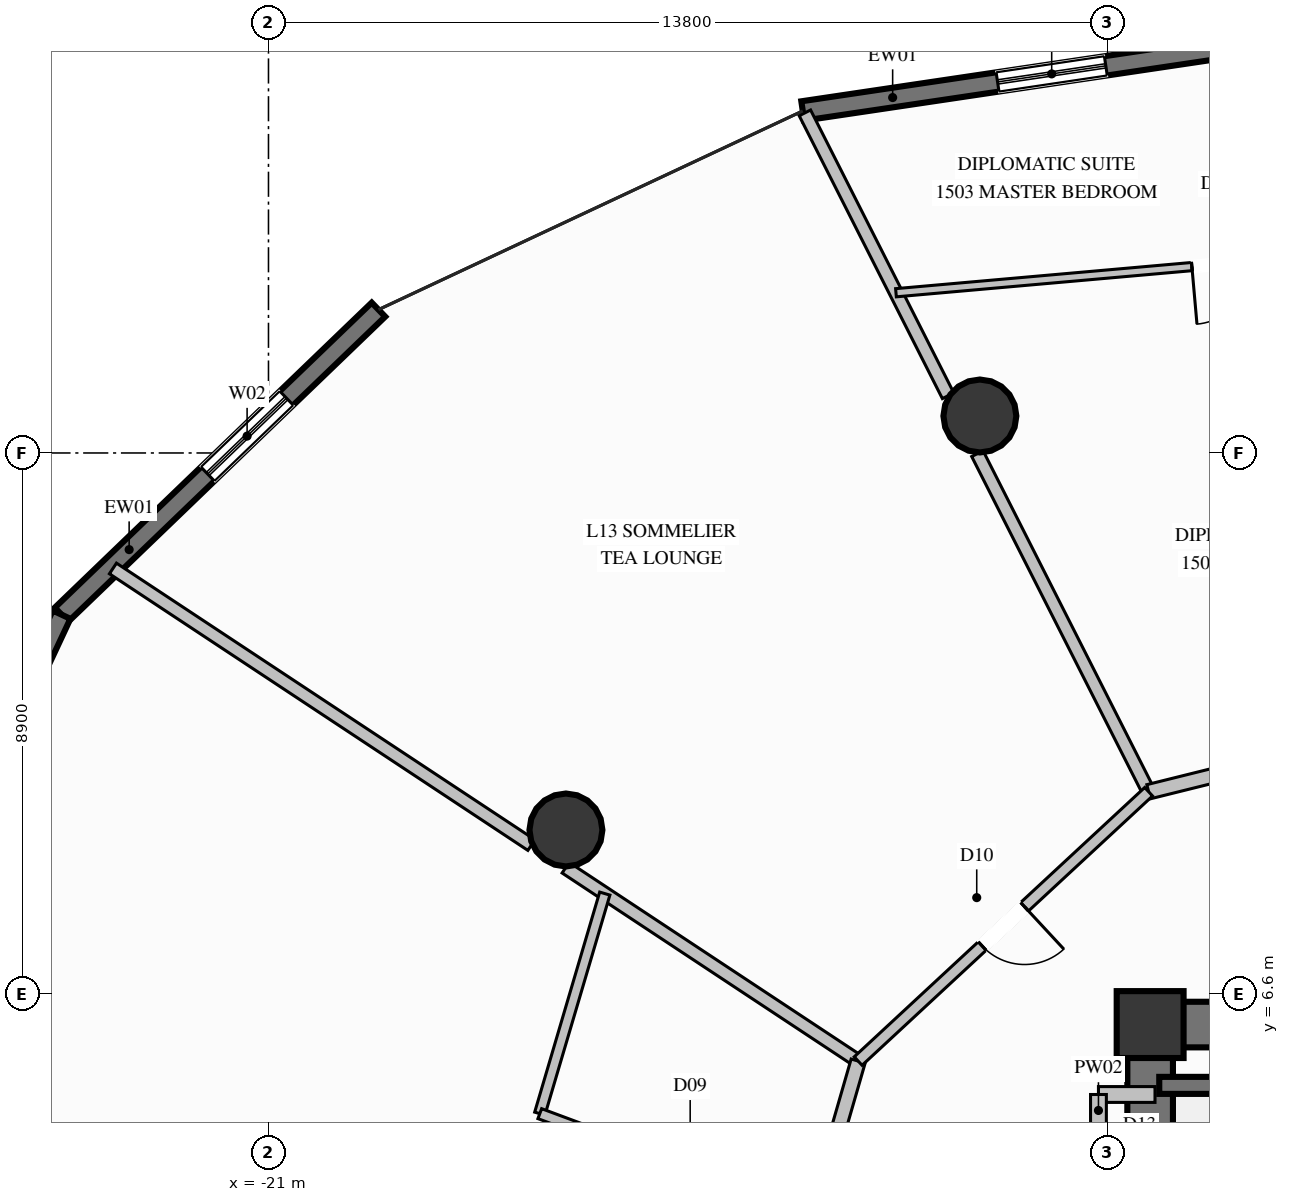
"""IFC4 building model, lengths in metres.
Left out: names, types, materials, properties, quantities, classifications, styles, units other than length and angle.
Written with IfcOpenShell. Run it as: python <this file> out.ifc"""

import sys

from ifc_helpers import new_model, si_unit, direction, frame, frame_2d, origin, origin_2d, place, context, subcontext, project, spatial, rectangle, circle, extrude, element, fill, save


model = new_model("IFC4")
c1 = context("Model", 3, precision=1e-05, world=origin(), true_north=direction((0.0, 1.0)))
c2 = subcontext(c1, "Body", "Model", "MODEL_VIEW")
j1 = project(units=[si_unit("LENGTHUNIT", "METRE"), si_unit("PLANEANGLEUNIT", "RADIAN")], contexts=[c1])
p1 = place(None, origin())
s1 = spatial("IfcSite", under=j1, at=p1, CompositionType="ELEMENT")
p2 = place(p1, origin())
s2 = spatial("IfcBuilding", under=s1, at=p2, CompositionType="ELEMENT")
p3 = place(p2, frame((0.0, 0.0, 57.2)))
s3 = spatial("IfcBuildingStorey", under=s2, at=p3, CompositionType="ELEMENT", Elevation=57.2)
p4 = place(p3, frame((-6.5, 6.1, 0.0), z_axis=(0.0, 0.0, 1.0), x_axis=(1.0, 0.0, 0.0)))
e1 = element("IfcColumn", 1, at=p4, inside=s3, PredefinedType="COLUMN", context=c2, shape_type="SweptSolid", body=[
    extrude(rectangle(XDim=1.1, YDim=1.1, at=origin_2d()), origin(), (0.0, 0.0, 1.0), 3.6),
])
p5 = place(p3, frame((-6.125, 6.1, 0.0), z_axis=(0.0, 0.0, 1.0), x_axis=(1.0, 0.0, 0.0)))
e2 = element("IfcWall", 2, at=p5, inside=s3, PredefinedType="SHEAR", context=c2, shape_type="SweptSolid", body=[
    extrude(rectangle(XDim=2.525, YDim=0.75, at=frame_2d((1.262, 0.0))), origin(), (0.0, 0.0, 1.0), 3.6),
])
p6 = place(p3, frame((-6.5, 2.35, 0.0), z_axis=(0.0, 0.0, 1.0), x_axis=(0.0, 1.0, 0.0)))
e3 = element("IfcWall", 3, at=p6, inside=s3, PredefinedType="SHEAR", context=c2, shape_type="SweptSolid", body=[
    extrude(rectangle(XDim=4.125, YDim=0.75, at=frame_2d((2.062, 0.0))), origin(), (0.0, 0.0, 1.0), 3.6),
])
for number, where, z_axis, x_axis in (
    (4, (-9.3, 16.108, 0.0), (0.0, 0.0, 1.0), (1.0, 0.0, 0.0)),
    (5, (-16.108, 9.3, 0.0), (0.0, 0.0, 1.0), (1.0, 0.0, 0.0)),
):
    element("IfcColumn", number, at=place(p3, frame(where, z_axis=z_axis, x_axis=x_axis)), inside=s3, PredefinedType="COLUMN", context=c2, shape_type="SweptSolid", body=[
        extrude(circle(Radius=0.6, at=origin_2d()), origin(), (0.0, 0.0, 1.0), 3.6),
    ])
p7 = place(p3, frame((-12.213, 21.125, 0.0), z_axis=(0.0, 0.0, 1.0), x_axis=(0.989115613059, 0.147140422734, 0.0)))
e6 = element("IfcWall", 6, at=p7, inside=s3, PredefinedType="SOLIDWALL", context=c2, shape_type="SweptSolid", body=[
    extrude(rectangle(XDim=8.148, YDim=0.32, at=frame_2d((4.074, 0.0))), origin(), (0.0, 0.0, 1.0), 3.34),
])
p8 = place(p7, frame((3.239, 0.0, 0.35)))
e7 = element("IfcOpeningElement", 7, at=p8, cuts=e6, PredefinedType="OPENING", context=c2, shape_type="SweptSolid", body=[
    extrude(rectangle(XDim=1.8, YDim=2.6, at=frame_2d((0.9, 1.3))), frame((0.0, 0.17, 0.0), z_axis=(0.0, -1.0, 0.0), x_axis=(1.0, 0.0, 0.0)), (0.0, 0.0, 1.0), 0.34),
])
p9 = place(p3, frame((-24.403, 12.841, 0.0), z_axis=(0.0, 0.0, 1.0), x_axis=(0.720544396029, 0.693408806802, 0.0)))
e8 = element("IfcWall", 8, at=p9, inside=s3, PredefinedType="SOLIDWALL", context=c2, shape_type="SweptSolid", body=[
    extrude(rectangle(XDim=7.234, YDim=0.32, at=frame_2d((3.617, 0.0))), origin(), (0.0, 0.0, 1.0), 3.34),
])
p10 = place(p9, frame((3.335, 0.0, 0.35)))
e9 = element("IfcOpeningElement", 9, at=p10, cuts=e8, PredefinedType="OPENING", context=c2, shape_type="SweptSolid", body=[
    extrude(rectangle(XDim=1.8, YDim=2.6, at=frame_2d((0.9, 1.3))), frame((0.0, 0.17, 0.0), z_axis=(0.0, -1.0, 0.0), x_axis=(1.0, 0.0, 0.0)), (0.0, 0.0, 1.0), 0.34),
])
p11 = place(p3, frame((-27.339, 6.568, 0.0), z_axis=(0.0, 0.0, 1.0), x_axis=(0.423911806675, 0.905703472535, 0.0)))
e10 = element("IfcWall", 10, at=p11, inside=s3, PredefinedType="SOLIDWALL", context=c2, shape_type="SweptSolid", body=[
    extrude(rectangle(XDim=6.926, YDim=0.32, at=frame_2d((3.463, 0.0))), origin(), (0.0, 0.0, 1.0), 3.34),
])
p12 = place(p11, frame((2.988, 0.0, 0.35)))
e11 = element("IfcOpeningElement", 11, at=p12, cuts=e10, PredefinedType="OPENING", context=c2, shape_type="SweptSolid", body=[
    extrude(rectangle(XDim=1.8, YDim=2.6, at=frame_2d((0.9, 1.3))), frame((0.0, 0.17, 0.0), z_axis=(0.0, -1.0, 0.0), x_axis=(1.0, 0.0, 0.0)), (0.0, 0.0, 1.0), 0.34),
])
p13 = place(p3, frame((-4.15, 5.1, 0.0), z_axis=(0.0, 0.0, 1.0), x_axis=(-1.0, 0.0, 0.0)))
e12 = element("IfcWall", 12, at=p13, inside=s3, PredefinedType="SOLIDWALL", context=c2, shape_type="SweptSolid", body=[
    extrude(rectangle(XDim=2.2, YDim=0.28, at=frame_2d((1.1, 0.0))), origin(), (0.0, 0.0, 1.0), 3.34),
])
p14 = place(p3, frame((-7.35, 4.95, 0.0), z_axis=(0.0, 0.0, 1.0), x_axis=(1.0, 0.0, 0.0)))
e13 = element("IfcWall", 13, at=p14, inside=s3, PredefinedType="PARTITIONING", context=c2, shape_type="SweptSolid", body=[
    extrude(rectangle(XDim=0.93, YDim=0.26, at=frame_2d((0.465, 0.0))), origin(), (0.0, 0.0, 1.0), 3.34),
])
p15 = place(p3, frame((-7.35, 2.55, 0.0), z_axis=(0.0, 0.0, 1.0), x_axis=(0.0, 1.0, 0.0)))
e14 = element("IfcWall", 14, at=p15, inside=s3, PredefinedType="PARTITIONING", context=c2, shape_type="SweptSolid", body=[
    extrude(rectangle(XDim=2.4, YDim=0.26, at=frame_2d((1.2, 0.0))), origin(), (0.0, 0.0, 1.0), 2.425),
])
p16 = place(p15, frame((0.775, 0.0, 0.0)))
e15 = element("IfcOpeningElement", 15, at=p16, cuts=e14, PredefinedType="OPENING", context=c2, shape_type="SweptSolid", body=[
    extrude(rectangle(XDim=0.85, YDim=2.05, at=frame_2d((0.425, 1.025))), frame((0.0, 0.14, 0.0), z_axis=(0.0, -1.0, 0.0), x_axis=(1.0, 0.0, 0.0)), (0.0, 0.0, 1.0), 0.28),
])
p17 = place(p3, frame((-6.525, 9.929, 0.0), z_axis=(0.0, 0.0, 1.0), x_axis=(-0.451845511916, 0.892096201853, 0.0)))
e16 = element("IfcWall", 16, at=p17, inside=s3, PredefinedType="PARTITIONING", context=c2, shape_type="SweptSolid", body=[
    extrude(rectangle(XDim=6.233, YDim=0.21, at=frame_2d((3.116, 0.0))), origin(), (0.0, 0.0, 1.0), 2.707),
])
p18 = place(p3, frame((-9.823, 16.441, 0.0), z_axis=(0.0, 0.0, 1.0), x_axis=(-0.451646831952, 0.892196805188, 0.0)))
e17 = element("IfcWall", 17, at=p18, inside=s3, PredefinedType="PARTITIONING", context=c2, shape_type="SweptSolid", body=[
    extrude(rectangle(XDim=5.214, YDim=0.21, at=frame_2d((2.607, 0.0))), origin(), (0.0, 0.0, 1.0), 3.34),
])
p19 = place(p3, frame((-11.302, 5.5, 0.0), z_axis=(0.0, 0.0, 1.0), x_axis=(-0.834238648556, 0.551403552088, 0.0)))
e18 = element("IfcWall", 18, at=p19, inside=s3, PredefinedType="PARTITIONING", context=c2, shape_type="SweptSolid", body=[
    extrude(rectangle(XDim=5.767, YDim=0.21, at=frame_2d((2.884, 0.0))), origin(), (0.0, 0.0, 1.0), 2.707),
])
p20 = place(p3, frame((-16.676, 9.052, 0.0), z_axis=(0.0, 0.0, 1.0), x_axis=(-0.834224712382, 0.551424636057, 0.0)))
e19 = element("IfcWall", 19, at=p20, inside=s3, PredefinedType="PARTITIONING", context=c2, shape_type="SweptSolid", body=[
    extrude(rectangle(XDim=8.25, YDim=0.21, at=frame_2d((4.125, 0.0))), origin(), (0.0, 0.0, 1.0), 3.34),
])
p21 = place(p3, frame((-11.302, 5.5, 0.0), z_axis=(0.0, 0.0, 1.0), x_axis=(-0.277475281216, -0.960732776746, 0.0)))
e20 = element("IfcWall", 20, at=p21, inside=s3, PredefinedType="PARTITIONING", context=c2, shape_type="SweptSolid", body=[
    extrude(rectangle(XDim=2.645, YDim=0.24, at=frame_2d((1.322, 0.0))), origin(), (0.0, 0.0, 1.0), 3.34),
])
p22 = place(p3, frame((-15.469, 8.254, 0.0), z_axis=(0.0, 0.0, 1.0), x_axis=(-0.283315036378, -0.959026897518, 0.0)))
e21 = element("IfcWall", 21, at=p22, inside=s3, PredefinedType="PLUMBINGWALL", context=c2, shape_type="SweptSolid", body=[
    extrude(rectangle(XDim=3.773, YDim=0.175, at=frame_2d((1.887, 0.0))), origin(), (0.0, 0.0, 1.0), 3.34),
])
p23 = place(p3, frame((-12.036, 2.959, 0.0), z_axis=(0.0, 0.0, 1.0), x_axis=(-0.937168147188, 0.348878007182, 0.0)))
e22 = element("IfcWall", 22, at=p23, inside=s3, PredefinedType="PLUMBINGWALL", context=c2, shape_type="SweptSolid", body=[
    extrude(rectangle(XDim=4.804, YDim=0.175, at=frame_2d((2.402, 0.0))), origin(), (0.0, 0.0, 1.0), 3.34),
])
p24 = place(p23, frame((1.952, 0.0, 0.0)))
e23 = element("IfcOpeningElement", 23, at=p24, cuts=e22, PredefinedType="OPENING", context=c2, shape_type="SweptSolid", body=[
    extrude(rectangle(XDim=0.9, YDim=2.1, at=frame_2d((0.45, 1.05))), frame((0.0, 0.098, 0.0), z_axis=(0.0, -1.0, 0.0), x_axis=(1.0, 0.0, 0.0)), (0.0, 0.0, 1.0), 0.195),
])
p25 = place(p3, frame((0.0, 11.55, 0.0), z_axis=(0.0, 0.0, 1.0), x_axis=(-0.970496047219, -0.241117030365, 0.0)))
e24 = element("IfcWall", 24, at=p25, inside=s3, PredefinedType="PARTITIONING", context=c2, shape_type="SweptSolid", body=[
    extrude(rectangle(XDim=6.723, YDim=0.24, at=frame_2d((3.362, 0.0))), origin(), (0.0, 0.0, 1.0), 2.919),
])
p26 = place(p3, frame((0.0, 19.079, 0.0), z_axis=(0.0, 0.0, 1.0), x_axis=(-0.996115587984, -0.088055297262, 0.0)))
e25 = element("IfcWall", 25, at=p26, inside=s3, PredefinedType="PARTITIONING", context=c2, shape_type="SweptSolid", body=[
    extrude(rectangle(XDim=10.722, YDim=0.135, at=frame_2d((5.361, 0.0))), origin(), (0.0, 0.0, 1.0), 2.792),
])
p27 = place(p26, frame((4.886, 0.0, 0.0)))
e26 = element("IfcOpeningElement", 26, at=p27, cuts=e25, PredefinedType="OPENING", context=c2, shape_type="SweptSolid", body=[
    extrude(rectangle(XDim=0.95, YDim=2.1, at=frame_2d((0.475, 1.05))), frame((0.0, 0.078, 0.0), z_axis=(0.0, -1.0, 0.0), x_axis=(1.0, 0.0, 0.0)), (0.0, 0.0, 1.0), 0.155),
])
p28 = place(p3, frame((-6.525, 9.929, 0.0), z_axis=(0.0, 0.0, 1.0), x_axis=(-0.733323191675, -0.679880207501, 0.0)))
e27 = element("IfcWall", 27, at=p28, inside=s3, PredefinedType="PARTITIONING", context=c2, shape_type="SweptSolid", body=[
    extrude(rectangle(XDim=6.514, YDim=0.19, at=frame_2d((3.257, 0.0))), origin(), (0.0, 0.0, 1.0), 3.34),
])
p29 = place(p28, frame((2.782, 0.0, 0.0)))
e28 = element("IfcOpeningElement", 28, at=p29, cuts=e27, PredefinedType="OPENING", context=c2, shape_type="SweptSolid", body=[
    extrude(rectangle(XDim=0.95, YDim=2.1, at=frame_2d((0.475, 1.05))), frame((0.0, 0.105, 0.0), z_axis=(0.0, -1.0, 0.0), x_axis=(1.0, 0.0, 0.0)), (0.0, 0.0, 1.0), 0.21),
])
p30 = place(p8, origin())
e29 = element("IfcWindow", 29, at=p30, inside=s3, PartitioningType="SINGLE_PANEL", PredefinedType="WINDOW", context=c2, shape_type="SweptSolid", body=[
    extrude(rectangle(XDim=1.8, YDim=2.6, at=frame_2d((0.9, 1.3))), frame((0.0, 0.03, 0.0), z_axis=(0.0, -1.0, 0.0), x_axis=(1.0, 0.0, 0.0)), (0.0, 0.0, 1.0), 0.06),
])
fill(e7, e29)
p31 = place(p10, origin())
e30 = element("IfcWindow", 30, at=p31, inside=s3, PartitioningType="SINGLE_PANEL", PredefinedType="WINDOW", context=c2, shape_type="SweptSolid", body=[
    extrude(rectangle(XDim=1.8, YDim=2.6, at=frame_2d((0.9, 1.3))), frame((0.0, 0.03, 0.0), z_axis=(0.0, -1.0, 0.0), x_axis=(1.0, 0.0, 0.0)), (0.0, 0.0, 1.0), 0.06),
])
fill(e9, e30)
p32 = place(p27, origin())
e31 = element("IfcDoor", 31, at=p32, inside=s3, OperationType="SINGLE_SWING_RIGHT", PredefinedType="DOOR", context=c2, shape_type="SweptSolid", body=[
    extrude(rectangle(XDim=0.95, YDim=2.1, at=frame_2d((0.475, 1.05))), frame((0.0, 0.025, 0.0), z_axis=(0.0, -1.0, 0.0), x_axis=(1.0, 0.0, 0.0)), (0.0, 0.0, 1.0), 0.05),
])
fill(e26, e31)
p33 = place(p29, origin())
e32 = element("IfcDoor", 32, at=p33, inside=s3, OperationType="SINGLE_SWING_LEFT", PredefinedType="DOOR", context=c2, shape_type="SweptSolid", body=[
    extrude(rectangle(XDim=0.95, YDim=2.1, at=frame_2d((0.475, 1.05))), frame((0.0, 0.025, 0.0), z_axis=(0.0, -1.0, 0.0), x_axis=(1.0, 0.0, 0.0)), (0.0, 0.0, 1.0), 0.05),
])
fill(e28, e32)
save(model, sys.argv[1])
